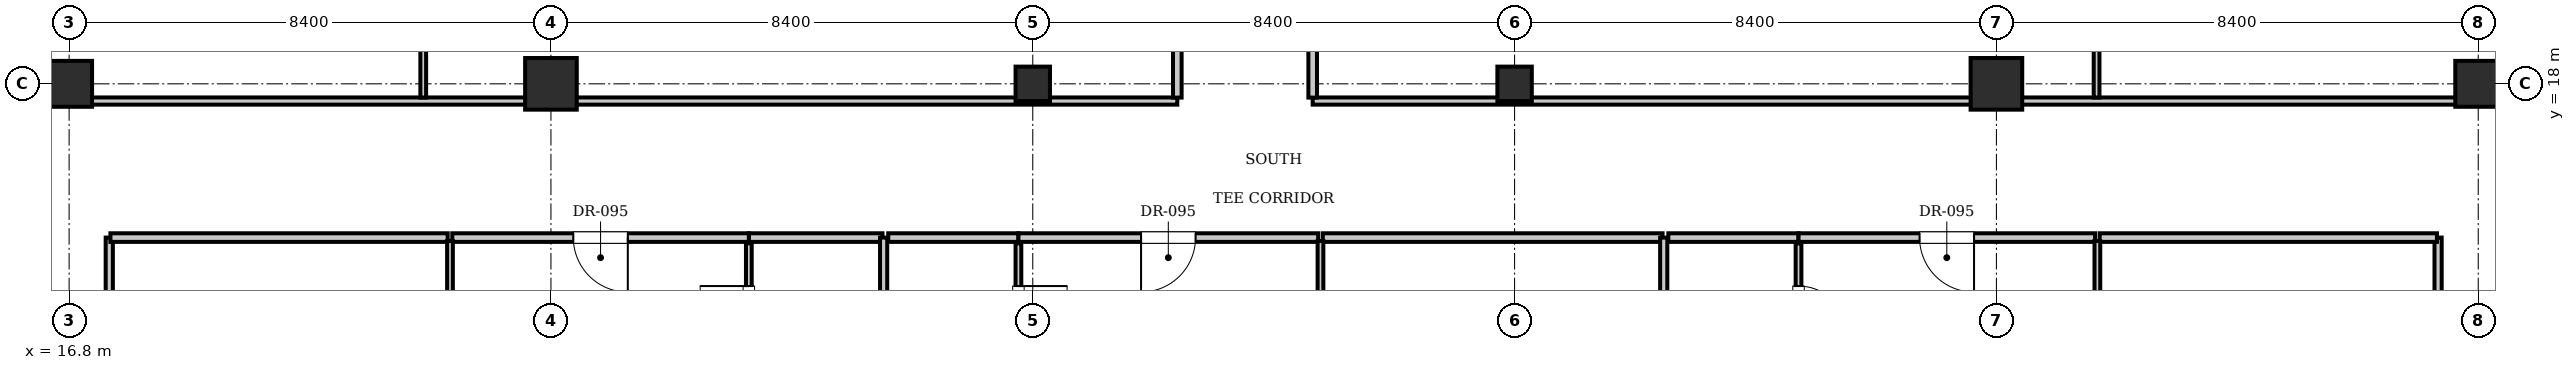
"""IFC4 building model, lengths in metres.
Left out: names, types, materials, properties, quantities, classifications, styles, units other than length and angle.
Written with IfcOpenShell. Run it as: python <this file> out.ifc"""

import sys

from ifc_helpers import new_model, si_unit, direction, frame, frame_2d, origin, origin_2d, place, context, subcontext, project, spatial, rectangle, i_section, extrude, element, fill, save


model = new_model("IFC4")
c1 = context("Model", 3, precision=1e-05, world=origin(), true_north=direction((0.0, 1.0)))
c2 = subcontext(c1, "Body", "Model", "MODEL_VIEW")
j1 = project(units=[si_unit("LENGTHUNIT", "METRE"), si_unit("PLANEANGLEUNIT", "RADIAN")], contexts=[c1])
p1 = place(None, origin())
s1 = spatial("IfcSite", under=j1, at=p1, CompositionType="ELEMENT")
p2 = place(p1, origin())
s2 = spatial("IfcBuilding", under=s1, at=p2, CompositionType="ELEMENT")
p3 = place(p2, frame((0.0, 0.0, 169.75)))
s3 = spatial("IfcBuildingStorey", under=s2, at=p3, CompositionType="ELEMENT", Elevation=169.75)
for number, where, z_axis, x_axis in (
    (1, (25.2, 18.0, 0.0), (0.0, 0.0, 1.0), (1.0, 0.0, 0.0)),
    (2, (50.4, 18.0, 0.0), (0.0, 0.0, 1.0), (1.0, 0.0, 0.0)),
):
    element("IfcColumn", number, at=place(p3, frame(where, z_axis=z_axis, x_axis=x_axis)), inside=s3, PredefinedType="COLUMN", context=c2, shape_type="SweptSolid", body=[
        extrude(rectangle(XDim=0.9, YDim=0.9, at=origin_2d()), origin(), (0.0, 0.0, 1.0), 3.85),
    ])
for number, where, z_axis, x_axis in (
    (3, (33.6, 18.0, 0.0), (0.0, 0.0, 1.0), (1.0, 0.0, 0.0)),
    (4, (42.0, 18.0, 0.0), (0.0, 0.0, 1.0), (1.0, 0.0, 0.0)),
):
    element("IfcColumn", number, at=place(p3, frame(where, z_axis=z_axis, x_axis=x_axis)), inside=s3, PredefinedType="COLUMN", context=c2, shape_type="SweptSolid", body=[
        extrude(i_section(OverallWidth=0.6, OverallDepth=0.6, WebThickness=0.025, FlangeThickness=0.038, at=origin_2d()), origin(), (0.0, 0.0, 1.0), 3.85),
    ])
for number, where, z_axis, x_axis in (
    (5, (16.8, 18.0, 0.0), (0.0, 0.0, 1.0), (1.0, 0.0, 0.0)),
    (6, (58.8, 18.0, 0.0), (0.0, 0.0, 1.0), (1.0, 0.0, 0.0)),
):
    element("IfcColumn", number, at=place(p3, frame(where, z_axis=z_axis, x_axis=x_axis)), inside=s3, PredefinedType="COLUMN", context=c2, shape_type="SweptSolid", body=[
        extrude(rectangle(XDim=0.8, YDim=0.8, at=origin_2d()), origin(), (0.0, 0.0, 1.0), 3.85),
    ])
for number, where, z_axis, x_axis in (
    (7, (17.5, 9.0, 0.0), (0.0, 0.0, 1.0), (0.0, 1.0, 0.0)),
    (8, (58.1, 9.0, 0.0), (0.0, 0.0, 1.0), (0.0, 1.0, 0.0)),
):
    element("IfcWall", number, at=place(p3, frame(where, z_axis=z_axis, x_axis=x_axis)), inside=s3, PredefinedType="PARTITIONING", context=c2, shape_type="SweptSolid", body=[
        extrude(rectangle(XDim=6.32, YDim=0.125, at=frame_2d((3.16, 0.0))), origin(), (0.0, 0.0, 1.0), 3.61),
    ])
p4 = place(p3, frame((28.65, 15.32, 0.0), z_axis=(0.0, 0.0, 1.0), x_axis=(1.0, 0.0, 0.0)))
e9 = element("IfcWall", 9, at=p4, inside=s3, PredefinedType="PARTITIONING", context=c2, shape_type="SweptSolid", body=[
    extrude(rectangle(XDim=2.33, YDim=0.15, at=frame_2d((1.165, 0.0))), origin(), (0.0, 0.0, 1.0), 3.61),
])
p5 = place(p3, frame((28.65, 12.88, 0.0), z_axis=(0.0, 0.0, 1.0), x_axis=(0.0, 1.0, 0.0)))
e10 = element("IfcWall", 10, at=p5, inside=s3, PredefinedType="PARTITIONING", context=c2, shape_type="SweptSolid", body=[
    extrude(rectangle(XDim=2.34, YDim=0.1, at=frame_2d((1.17, 0.0))), origin(), (0.0, 0.0, 1.0), 3.61),
])
p6 = place(p5, frame((0.745, 0.0, 0.0)))
e11 = element("IfcOpeningElement", 11, at=p6, cuts=e10, PredefinedType="OPENING", context=c2, shape_type="SweptSolid", body=[
    extrude(rectangle(XDim=0.85, YDim=2.1, at=frame_2d((0.425, 1.05))), frame((0.0, 0.06, 0.0), z_axis=(0.0, -1.0, 0.0), x_axis=(1.0, 0.0, 0.0)), (0.0, 0.0, 1.0), 0.12),
])
p7 = place(p3, frame((17.52, 15.32, 0.0), z_axis=(0.0, 0.0, 1.0), x_axis=(1.0, 0.0, 0.0)))
e12 = element("IfcWall", 12, at=p7, inside=s3, PredefinedType="PARTITIONING", context=c2, shape_type="SweptSolid", body=[
    extrude(rectangle(XDim=5.88, YDim=0.15, at=frame_2d((2.94, 0.0))), origin(), (0.0, 0.0, 1.0), 3.61),
])
p8 = place(p3, frame((23.48, 15.32, 0.0), z_axis=(0.0, 0.0, 1.0), x_axis=(1.0, 0.0, 0.0)))
e13 = element("IfcWall", 13, at=p8, inside=s3, PredefinedType="PARTITIONING", context=c2, shape_type="SweptSolid", body=[
    extrude(rectangle(XDim=5.17, YDim=0.15, at=frame_2d((2.585, 0.0))), origin(), (0.0, 0.0, 1.0), 3.61),
])
p9 = place(p8, frame((2.11, 0.0, 0.0)))
e14 = element("IfcOpeningElement", 14, at=p9, cuts=e13, PredefinedType="OPENING", context=c2, shape_type="SweptSolid", body=[
    extrude(rectangle(XDim=0.95, YDim=2.15, at=frame_2d((0.475, 1.075))), frame((0.0, 0.085, 0.0), z_axis=(0.0, -1.0, 0.0), x_axis=(1.0, 0.0, 0.0)), (0.0, 0.0, 1.0), 0.17),
])
p10 = place(p3, frame((23.44, 4.63, 0.0), z_axis=(0.0, 0.0, 1.0), x_axis=(0.0, 1.0, 0.0)))
e15 = element("IfcWall", 15, at=p10, inside=s3, PredefinedType="PARTITIONING", context=c2, shape_type="SweptSolid", body=[
    extrude(rectangle(XDim=10.63, YDim=0.1, at=frame_2d((5.315, 0.0))), origin(), (0.0, 0.0, 1.0), 3.61),
])
p11 = place(p10, frame((1.6, 0.0, 0.0)))
e16 = element("IfcOpeningElement", 16, at=p11, cuts=e15, PredefinedType="OPENING", context=c2, shape_type="SweptSolid", body=[
    extrude(rectangle(XDim=0.9, YDim=2.1, at=frame_2d((0.45, 1.05))), frame((0.0, 0.06, 0.0), z_axis=(0.0, -1.0, 0.0), x_axis=(1.0, 0.0, 0.0)), (0.0, 0.0, 1.0), 0.12),
])
p12 = place(p3, frame((31.0, 4.7, 0.0), z_axis=(0.0, 0.0, 1.0), x_axis=(0.0, 1.0, 0.0)))
e17 = element("IfcWall", 17, at=p12, inside=s3, PredefinedType="PARTITIONING", context=c2, shape_type="SweptSolid", body=[
    extrude(rectangle(XDim=10.62, YDim=0.125, at=frame_2d((5.31, 0.0))), origin(), (0.0, 0.0, 1.0), 3.61),
])
p13 = place(p3, frame((31.08, 15.32, 0.0), z_axis=(0.0, 0.0, 1.0), x_axis=(1.0, 0.0, 0.0)))
e18 = element("IfcWall", 18, at=p13, inside=s3, PredefinedType="PARTITIONING", context=c2, shape_type="SweptSolid", body=[
    extrude(rectangle(XDim=2.27, YDim=0.15, at=frame_2d((1.135, 0.0))), origin(), (0.0, 0.0, 1.0), 3.61),
])
p14 = place(p3, frame((33.35, 12.88, 0.0), z_axis=(0.0, 0.0, 1.0), x_axis=(0.0, 1.0, 0.0)))
e19 = element("IfcWall", 19, at=p14, inside=s3, PredefinedType="PARTITIONING", context=c2, shape_type="SweptSolid", body=[
    extrude(rectangle(XDim=2.34, YDim=0.1, at=frame_2d((1.17, 0.0))), origin(), (0.0, 0.0, 1.0), 3.61),
])
p15 = place(p14, frame((0.745, 0.0, 0.0)))
e20 = element("IfcOpeningElement", 20, at=p15, cuts=e19, PredefinedType="OPENING", context=c2, shape_type="SweptSolid", body=[
    extrude(rectangle(XDim=0.85, YDim=2.1, at=frame_2d((0.425, 1.05))), frame((0.0, 0.06, 0.0), z_axis=(0.0, -1.0, 0.0), x_axis=(1.0, 0.0, 0.0)), (0.0, 0.0, 1.0), 0.12),
])
p16 = place(p3, frame((33.35, 15.32, 0.0), z_axis=(0.0, 0.0, 1.0), x_axis=(1.0, 0.0, 0.0)))
e21 = element("IfcWall", 21, at=p16, inside=s3, PredefinedType="PARTITIONING", context=c2, shape_type="SweptSolid", body=[
    extrude(rectangle(XDim=5.226, YDim=0.15, at=frame_2d((2.613, 0.0))), origin(), (0.0, 0.0, 1.0), 3.61),
])
p17 = place(p16, frame((2.138, 0.0, 0.0)))
e22 = element("IfcOpeningElement", 22, at=p17, cuts=e21, PredefinedType="OPENING", context=c2, shape_type="SweptSolid", body=[
    extrude(rectangle(XDim=0.95, YDim=2.15, at=frame_2d((0.475, 1.075))), frame((0.0, 0.085, 0.0), z_axis=(0.0, -1.0, 0.0), x_axis=(1.0, 0.0, 0.0)), (0.0, 0.0, 1.0), 0.17),
])
p18 = place(p3, frame((38.656, 15.32, 0.0), z_axis=(0.0, 0.0, 1.0), x_axis=(1.0, 0.0, 0.0)))
e23 = element("IfcWall", 23, at=p18, inside=s3, PredefinedType="PARTITIONING", context=c2, shape_type="SweptSolid", body=[
    extrude(rectangle(XDim=5.924, YDim=0.15, at=frame_2d((2.962, 0.0))), origin(), (0.0, 0.0, 1.0), 3.61),
])
p19 = place(p3, frame((38.616, 4.63, 0.0), z_axis=(0.0, 0.0, 1.0), x_axis=(0.0, 1.0, 0.0)))
e24 = element("IfcWall", 24, at=p19, inside=s3, PredefinedType="PARTITIONING", context=c2, shape_type="SweptSolid", body=[
    extrude(rectangle(XDim=10.63, YDim=0.1, at=frame_2d((5.315, 0.0))), origin(), (0.0, 0.0, 1.0), 3.61),
])
p20 = place(p19, frame((1.6, 0.0, 0.0)))
e25 = element("IfcOpeningElement", 25, at=p20, cuts=e24, PredefinedType="OPENING", context=c2, shape_type="SweptSolid", body=[
    extrude(rectangle(XDim=0.9, YDim=2.1, at=frame_2d((0.45, 1.05))), frame((0.0, 0.06, 0.0), z_axis=(0.0, -1.0, 0.0), x_axis=(1.0, 0.0, 0.0)), (0.0, 0.0, 1.0), 0.12),
])
p21 = place(p3, frame((44.6, 4.7, 0.0), z_axis=(0.0, 0.0, 1.0), x_axis=(0.0, 1.0, 0.0)))
e26 = element("IfcWall", 26, at=p21, inside=s3, PredefinedType="PARTITIONING", context=c2, shape_type="SweptSolid", body=[
    extrude(rectangle(XDim=10.62, YDim=0.125, at=frame_2d((5.31, 0.0))), origin(), (0.0, 0.0, 1.0), 3.61),
])
p22 = place(p3, frame((44.68, 15.32, 0.0), z_axis=(0.0, 0.0, 1.0), x_axis=(1.0, 0.0, 0.0)))
e27 = element("IfcWall", 27, at=p22, inside=s3, PredefinedType="PARTITIONING", context=c2, shape_type="SweptSolid", body=[
    extrude(rectangle(XDim=2.27, YDim=0.15, at=frame_2d((1.135, 0.0))), origin(), (0.0, 0.0, 1.0), 3.61),
])
p23 = place(p3, frame((46.95, 12.88, 0.0), z_axis=(0.0, 0.0, 1.0), x_axis=(0.0, 1.0, 0.0)))
e28 = element("IfcWall", 28, at=p23, inside=s3, PredefinedType="PARTITIONING", context=c2, shape_type="SweptSolid", body=[
    extrude(rectangle(XDim=2.34, YDim=0.1, at=frame_2d((1.17, 0.0))), origin(), (0.0, 0.0, 1.0), 3.61),
])
p24 = place(p23, frame((0.745, 0.0, 0.0)))
e29 = element("IfcOpeningElement", 29, at=p24, cuts=e28, PredefinedType="OPENING", context=c2, shape_type="SweptSolid", body=[
    extrude(rectangle(XDim=0.85, YDim=2.1, at=frame_2d((0.425, 1.05))), frame((0.0, 0.06, 0.0), z_axis=(0.0, -1.0, 0.0), x_axis=(1.0, 0.0, 0.0)), (0.0, 0.0, 1.0), 0.12),
])
p25 = place(p3, frame((46.95, 15.32, 0.0), z_axis=(0.0, 0.0, 1.0), x_axis=(1.0, 0.0, 0.0)))
e30 = element("IfcWall", 30, at=p25, inside=s3, PredefinedType="PARTITIONING", context=c2, shape_type="SweptSolid", body=[
    extrude(rectangle(XDim=5.17, YDim=0.15, at=frame_2d((2.585, 0.0))), origin(), (0.0, 0.0, 1.0), 3.61),
])
p26 = place(p25, frame((2.11, 0.0, 0.0)))
e31 = element("IfcOpeningElement", 31, at=p26, cuts=e30, PredefinedType="OPENING", context=c2, shape_type="SweptSolid", body=[
    extrude(rectangle(XDim=0.95, YDim=2.15, at=frame_2d((0.475, 1.075))), frame((0.0, 0.085, 0.0), z_axis=(0.0, -1.0, 0.0), x_axis=(1.0, 0.0, 0.0)), (0.0, 0.0, 1.0), 0.17),
])
p27 = place(p3, frame((52.2, 15.32, 0.0), z_axis=(0.0, 0.0, 1.0), x_axis=(1.0, 0.0, 0.0)))
e32 = element("IfcWall", 32, at=p27, inside=s3, PredefinedType="PARTITIONING", context=c2, shape_type="SweptSolid", body=[
    extrude(rectangle(XDim=5.88, YDim=0.15, at=frame_2d((2.94, 0.0))), origin(), (0.0, 0.0, 1.0), 3.61),
])
p28 = place(p3, frame((52.16, 4.63, 0.0), z_axis=(0.0, 0.0, 1.0), x_axis=(0.0, 1.0, 0.0)))
e33 = element("IfcWall", 33, at=p28, inside=s3, PredefinedType="PARTITIONING", context=c2, shape_type="SweptSolid", body=[
    extrude(rectangle(XDim=10.63, YDim=0.1, at=frame_2d((5.315, 0.0))), origin(), (0.0, 0.0, 1.0), 3.61),
])
p29 = place(p28, frame((1.6, 0.0, 0.0)))
e34 = element("IfcOpeningElement", 34, at=p29, cuts=e33, PredefinedType="OPENING", context=c2, shape_type="SweptSolid", body=[
    extrude(rectangle(XDim=0.9, YDim=2.1, at=frame_2d((0.45, 1.05))), frame((0.0, 0.06, 0.0), z_axis=(0.0, -1.0, 0.0), x_axis=(1.0, 0.0, 0.0)), (0.0, 0.0, 1.0), 0.12),
])
p30 = place(p3, frame((13.2, 17.7, 0.0), z_axis=(0.0, 0.0, 1.0), x_axis=(1.0, 0.0, 0.0)))
e35 = element("IfcWall", 35, at=p30, inside=s3, PredefinedType="PARTITIONING", context=c2, shape_type="SweptSolid", body=[
    extrude(rectangle(XDim=22.92, YDim=0.125, at=frame_2d((11.46, 0.0))), origin(), (0.0, 0.0, 1.0), 3.61),
])
p31 = place(p3, frame((38.48, 17.7, 0.0), z_axis=(0.0, 0.0, 1.0), x_axis=(1.0, 0.0, 0.0)))
e36 = element("IfcWall", 36, at=p31, inside=s3, PredefinedType="PARTITIONING", context=c2, shape_type="SweptSolid", body=[
    extrude(rectangle(XDim=23.92, YDim=0.125, at=frame_2d((11.96, 0.0))), origin(), (0.0, 0.0, 1.0), 3.61),
])
p32 = place(p3, frame((36.12, 17.76, 0.0), z_axis=(0.0, 0.0, 1.0), x_axis=(0.0, 1.0, 0.0)))
e37 = element("IfcWall", 37, at=p32, inside=s3, PredefinedType="PARTITIONING", context=c2, shape_type="SweptSolid", body=[
    extrude(rectangle(XDim=4.24, YDim=0.15, at=frame_2d((2.12, 0.0))), origin(), (0.0, 0.0, 1.0), 3.61),
])
p33 = place(p32, frame((1.645, 0.0, 0.0)))
e38 = element("IfcOpeningElement", 38, at=p33, cuts=e37, PredefinedType="OPENING", context=c2, shape_type="SweptSolid", body=[
    extrude(rectangle(XDim=0.95, YDim=2.15, at=frame_2d((0.475, 1.075))), frame((0.0, 0.085, 0.0), z_axis=(0.0, -1.0, 0.0), x_axis=(1.0, 0.0, 0.0)), (0.0, 0.0, 1.0), 0.17),
])
p34 = place(p3, frame((22.974, 17.76, 0.0), z_axis=(0.0, 0.0, 1.0), x_axis=(0.0, 1.0, 0.0)))
e39 = element("IfcWall", 39, at=p34, inside=s3, PredefinedType="PARTITIONING", context=c2, shape_type="SweptSolid", body=[
    extrude(rectangle(XDim=6.53, YDim=0.1, at=frame_2d((3.265, 0.0))), origin(), (0.0, 0.0, 1.0), 3.61),
])
p35 = place(p34, frame((2.815, 0.0, 0.0)))
e40 = element("IfcOpeningElement", 40, at=p35, cuts=e39, PredefinedType="OPENING", context=c2, shape_type="SweptSolid", body=[
    extrude(rectangle(XDim=0.9, YDim=2.1, at=frame_2d((0.45, 1.05))), frame((0.0, 0.06, 0.0), z_axis=(0.0, -1.0, 0.0), x_axis=(1.0, 0.0, 0.0)), (0.0, 0.0, 1.0), 0.12),
])
p36 = place(p3, frame((38.48, 17.76, 0.0), z_axis=(0.0, 0.0, 1.0), x_axis=(0.0, 1.0, 0.0)))
e41 = element("IfcWall", 41, at=p36, inside=s3, PredefinedType="PARTITIONING", context=c2, shape_type="SweptSolid", body=[
    extrude(rectangle(XDim=4.24, YDim=0.15, at=frame_2d((2.12, 0.0))), origin(), (0.0, 0.0, 1.0), 3.61),
])
p37 = place(p36, frame((1.645, 0.0, 0.0)))
e42 = element("IfcOpeningElement", 42, at=p37, cuts=e41, PredefinedType="OPENING", context=c2, shape_type="SweptSolid", body=[
    extrude(rectangle(XDim=0.95, YDim=2.15, at=frame_2d((0.475, 1.075))), frame((0.0, 0.085, 0.0), z_axis=(0.0, -1.0, 0.0), x_axis=(1.0, 0.0, 0.0)), (0.0, 0.0, 1.0), 0.17),
])
p38 = place(p3, frame((52.146, 17.76, 0.0), z_axis=(0.0, 0.0, 1.0), x_axis=(0.0, 1.0, 0.0)))
e43 = element("IfcWall", 43, at=p38, inside=s3, PredefinedType="PARTITIONING", context=c2, shape_type="SweptSolid", body=[
    extrude(rectangle(XDim=6.53, YDim=0.1, at=frame_2d((3.265, 0.0))), origin(), (0.0, 0.0, 1.0), 3.61),
])
p39 = place(p38, frame((2.815, 0.0, 0.0)))
e44 = element("IfcOpeningElement", 44, at=p39, cuts=e43, PredefinedType="OPENING", context=c2, shape_type="SweptSolid", body=[
    extrude(rectangle(XDim=0.9, YDim=2.1, at=frame_2d((0.45, 1.05))), frame((0.0, 0.06, 0.0), z_axis=(0.0, -1.0, 0.0), x_axis=(1.0, 0.0, 0.0)), (0.0, 0.0, 1.0), 0.12),
])
p40 = place(p6, origin())
e45 = element("IfcDoor", 45, at=p40, inside=s3, OperationType="SINGLE_SWING_RIGHT", PredefinedType="DOOR", context=c2, shape_type="SweptSolid", body=[
    extrude(rectangle(XDim=0.85, YDim=2.1, at=frame_2d((0.425, 1.05))), frame((0.0, 0.025, 0.0), z_axis=(0.0, -1.0, 0.0), x_axis=(1.0, 0.0, 0.0)), (0.0, 0.0, 1.0), 0.05),
])
fill(e11, e45)
p41 = place(p9, frame((0.95, 0.0, 0.0), z_axis=(0.0, 0.0, 1.0), x_axis=(-1.0, 0.0, 0.0)))
e46 = element("IfcDoor", 46, at=p41, inside=s3, OperationType="SINGLE_SWING_LEFT", PredefinedType="DOOR", context=c2, shape_type="SweptSolid", body=[
    extrude(rectangle(XDim=0.95, YDim=2.15, at=frame_2d((0.475, 1.075))), frame((0.0, 0.025, 0.0), z_axis=(0.0, -1.0, 0.0), x_axis=(1.0, 0.0, 0.0)), (0.0, 0.0, 1.0), 0.05),
])
fill(e14, e46)
p42 = place(p15, frame((0.85, 0.0, 0.0), z_axis=(0.0, 0.0, 1.0), x_axis=(-1.0, 0.0, 0.0)))
e47 = element("IfcDoor", 47, at=p42, inside=s3, OperationType="SINGLE_SWING_LEFT", PredefinedType="DOOR", context=c2, shape_type="SweptSolid", body=[
    extrude(rectangle(XDim=0.85, YDim=2.1, at=frame_2d((0.425, 1.05))), frame((0.0, 0.025, 0.0), z_axis=(0.0, -1.0, 0.0), x_axis=(1.0, 0.0, 0.0)), (0.0, 0.0, 1.0), 0.05),
])
fill(e20, e47)
p43 = place(p17, frame((0.95, 0.0, 0.0), z_axis=(0.0, 0.0, 1.0), x_axis=(-1.0, 0.0, 0.0)))
e48 = element("IfcDoor", 48, at=p43, inside=s3, OperationType="SINGLE_SWING_RIGHT", PredefinedType="DOOR", context=c2, shape_type="SweptSolid", body=[
    extrude(rectangle(XDim=0.95, YDim=2.15, at=frame_2d((0.475, 1.075))), frame((0.0, 0.025, 0.0), z_axis=(0.0, -1.0, 0.0), x_axis=(1.0, 0.0, 0.0)), (0.0, 0.0, 1.0), 0.05),
])
fill(e22, e48)
p44 = place(p24, frame((0.85, 0.0, 0.0), z_axis=(0.0, 0.0, 1.0), x_axis=(-1.0, 0.0, 0.0)))
e49 = element("IfcDoor", 49, at=p44, inside=s3, OperationType="SINGLE_SWING_RIGHT", PredefinedType="DOOR", context=c2, shape_type="SweptSolid", body=[
    extrude(rectangle(XDim=0.85, YDim=2.1, at=frame_2d((0.425, 1.05))), frame((0.0, 0.025, 0.0), z_axis=(0.0, -1.0, 0.0), x_axis=(1.0, 0.0, 0.0)), (0.0, 0.0, 1.0), 0.05),
])
fill(e29, e49)
p45 = place(p26, frame((0.95, 0.0, 0.0), z_axis=(0.0, 0.0, 1.0), x_axis=(-1.0, 0.0, 0.0)))
e50 = element("IfcDoor", 50, at=p45, inside=s3, OperationType="SINGLE_SWING_LEFT", PredefinedType="DOOR", context=c2, shape_type="SweptSolid", body=[
    extrude(rectangle(XDim=0.95, YDim=2.15, at=frame_2d((0.475, 1.075))), frame((0.0, 0.025, 0.0), z_axis=(0.0, -1.0, 0.0), x_axis=(1.0, 0.0, 0.0)), (0.0, 0.0, 1.0), 0.05),
])
fill(e31, e50)
save(model, sys.argv[1])
